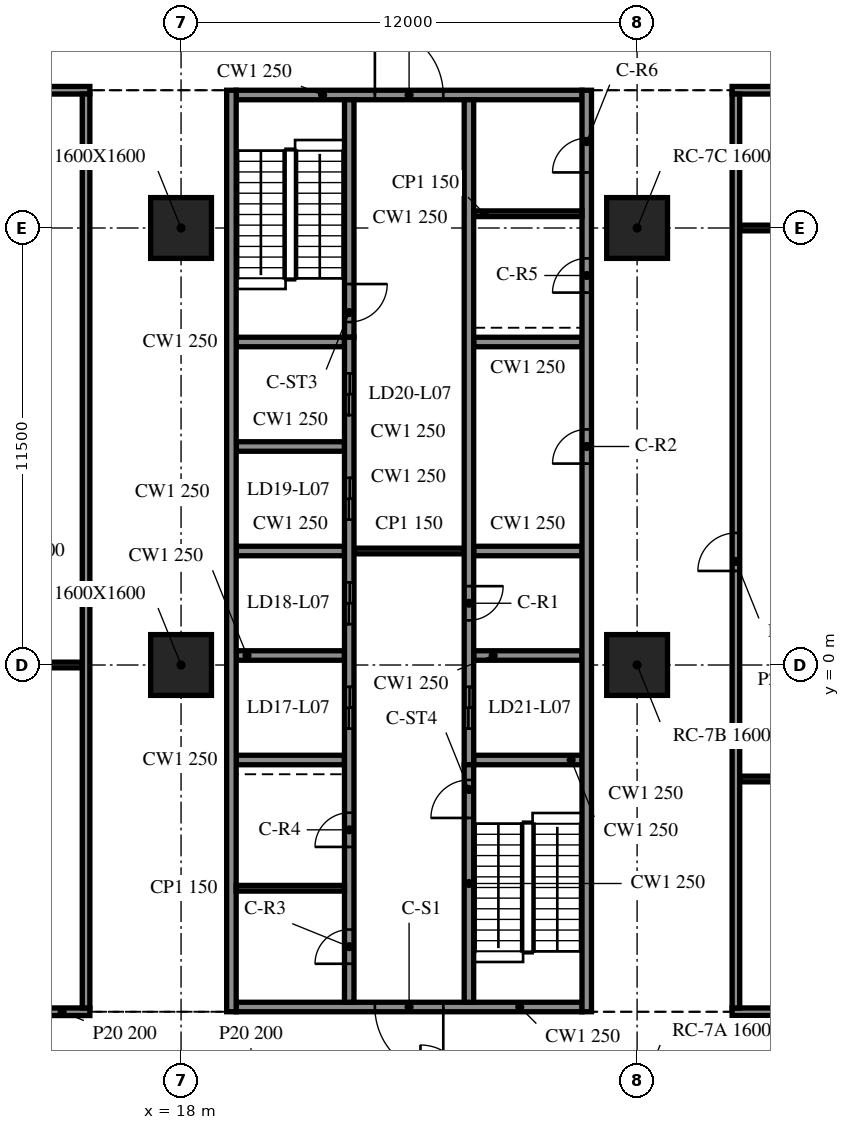
"""IFC4 building model, lengths in metres.
Left out: names, types, materials, properties, quantities, classifications, styles, units other than length and angle.
Written with IfcOpenShell. Run it as: python <this file> out.ifc"""

import sys

from ifc_helpers import new_model, si_unit, direction, frame, frame_2d, origin, origin_2d, place, context, subcontext, project, spatial, rectangle, extrude, element, fill, save


model = new_model("IFC4")
c1 = context("Model", 3, precision=1e-05, world=origin(), true_north=direction((0.0, 1.0)))
c2 = subcontext(c1, "Body", "Model", "MODEL_VIEW")
j1 = project(units=[si_unit("LENGTHUNIT", "METRE"), si_unit("PLANEANGLEUNIT", "RADIAN")], contexts=[c1])
p1 = place(None, origin())
s1 = spatial("IfcSite", under=j1, at=p1, CompositionType="ELEMENT")
p2 = place(p1, origin())
s2 = spatial("IfcBuilding", under=s1, at=p2, CompositionType="ELEMENT")
p3 = place(p2, frame((0.0, 0.0, 33.0)))
s3 = spatial("IfcBuildingStorey", under=s2, at=p3, CompositionType="ELEMENT", Elevation=33.0)
for number, where, z_axis, x_axis in (
    (1, (18.0, 0.0, -0.34), (0.0, 0.0, 1.0), (1.0, 0.0, 0.0)),
    (2, (18.0, 11.5, -0.34), (0.0, 0.0, 1.0), (1.0, 0.0, 0.0)),
    (3, (30.0, 0.0, -0.34), (0.0, 0.0, 1.0), (1.0, 0.0, 0.0)),
    (4, (30.0, 11.5, -0.34), (0.0, 0.0, 1.0), (1.0, 0.0, 0.0)),
):
    element("IfcColumn", number, at=place(p3, frame(where, z_axis=z_axis, x_axis=x_axis)), inside=s3, PredefinedType="COLUMN", context=c2, shape_type="SweptSolid", body=[
        extrude(rectangle(XDim=1.6, YDim=1.6, at=origin_2d()), origin(), (0.0, 0.0, 1.0), 4.3),
    ])
p4 = place(p3, frame((19.325, 15.125, 0.0), z_axis=(0.0, 0.0, 1.0), x_axis=(0.0, -1.0, 0.0)))
e5 = element("IfcWall", 5, at=p4, inside=s3, PredefinedType="SOLIDWALL", context=c2, shape_type="SweptSolid", body=[
    extrude(rectangle(XDim=24.25, YDim=0.25, at=frame_2d((12.125, 0.0))), origin(), (0.0, 0.0, 1.0), 3.96),
])
p5 = place(p3, frame((28.675, -9.125, 0.0), z_axis=(0.0, 0.0, 1.0), x_axis=(0.0, 1.0, 0.0)))
e6 = element("IfcWall", 6, at=p5, inside=s3, PredefinedType="SOLIDWALL", context=c2, shape_type="SweptSolid", body=[
    extrude(rectangle(XDim=24.25, YDim=0.25, at=frame_2d((12.125, 0.0))), origin(), (0.0, 0.0, 1.0), 3.96),
])
p6 = place(p5, frame((14.425, 0.0, 0.0)))
e7 = element("IfcOpeningElement", 7, at=p6, cuts=e6, PredefinedType="OPENING", context=c2, shape_type="SweptSolid", body=[
    extrude(rectangle(XDim=0.9, YDim=2.1, at=frame_2d((0.45, 1.05))), frame((0.0, 0.135, 0.0), z_axis=(0.0, -1.0, 0.0), x_axis=(1.0, 0.0, 0.0)), (0.0, 0.0, 1.0), 0.27),
])
p7 = place(p5, frame((18.925, 0.0, 0.0)))
e8 = element("IfcOpeningElement", 8, at=p7, cuts=e6, PredefinedType="OPENING", context=c2, shape_type="SweptSolid", body=[
    extrude(rectangle(XDim=0.9, YDim=2.1, at=frame_2d((0.45, 1.05))), frame((0.0, 0.135, 0.0), z_axis=(0.0, -1.0, 0.0), x_axis=(1.0, 0.0, 0.0)), (0.0, 0.0, 1.0), 0.27),
])
p8 = place(p5, frame((22.087, 0.0, 0.0)))
e9 = element("IfcOpeningElement", 9, at=p8, cuts=e6, PredefinedType="OPENING", context=c2, shape_type="SweptSolid", body=[
    extrude(rectangle(XDim=0.9, YDim=2.1, at=frame_2d((0.45, 1.05))), frame((0.0, 0.135, 0.0), z_axis=(0.0, -1.0, 0.0), x_axis=(1.0, 0.0, 0.0)), (0.0, 0.0, 1.0), 0.27),
])
p9 = place(p3, frame((28.55, -9.0, 0.0), z_axis=(0.0, 0.0, 1.0), x_axis=(-1.0, 0.0, 0.0)))
e10 = element("IfcWall", 10, at=p9, inside=s3, PredefinedType="SOLIDWALL", context=c2, shape_type="SweptSolid", body=[
    extrude(rectangle(XDim=9.1, YDim=0.25, at=frame_2d((4.55, 0.0))), origin(), (0.0, 0.0, 1.0), 3.96),
])
p10 = place(p9, frame((3.65, 0.0, 0.0)))
e11 = element("IfcOpeningElement", 11, at=p10, cuts=e10, PredefinedType="OPENING", context=c2, shape_type="SweptSolid", body=[
    extrude(rectangle(XDim=1.8, YDim=2.1, at=frame_2d((0.9, 1.05))), frame((0.0, 0.135, 0.0), z_axis=(0.0, -1.0, 0.0), x_axis=(1.0, 0.0, 0.0)), (0.0, 0.0, 1.0), 0.27),
])
p11 = place(p3, frame((19.45, 15.0, 0.0), z_axis=(0.0, 0.0, 1.0), x_axis=(1.0, 0.0, 0.0)))
e12 = element("IfcWall", 12, at=p11, inside=s3, PredefinedType="SOLIDWALL", context=c2, shape_type="SweptSolid", body=[
    extrude(rectangle(XDim=9.1, YDim=0.25, at=frame_2d((4.55, 0.0))), origin(), (0.0, 0.0, 1.0), 3.96),
])
p12 = place(p11, frame((3.65, 0.0, 0.0)))
e13 = element("IfcOpeningElement", 13, at=p12, cuts=e12, PredefinedType="OPENING", context=c2, shape_type="SweptSolid", body=[
    extrude(rectangle(XDim=1.8, YDim=2.1, at=frame_2d((0.9, 1.05))), frame((0.0, 0.135, 0.0), z_axis=(0.0, -1.0, 0.0), x_axis=(1.0, 0.0, 0.0)), (0.0, 0.0, 1.0), 0.27),
])
p13 = place(p3, frame((22.425, -8.875, 0.0), z_axis=(0.0, 0.0, 1.0), x_axis=(0.0, 1.0, 0.0)))
e14 = element("IfcWall", 14, at=p13, inside=s3, PredefinedType="SOLIDWALL", context=c2, shape_type="SweptSolid", body=[
    extrude(rectangle(XDim=17.5, YDim=0.25, at=frame_2d((8.75, 0.0))), origin(), (0.0, 0.0, 1.0), 3.96),
])
p14 = place(p13, frame((7.2, 0.0, 0.0)))
e15 = element("IfcOpeningElement", 15, at=p14, cuts=e14, PredefinedType="OPENING", context=c2, shape_type="SweptSolid", body=[
    extrude(rectangle(XDim=1.1, YDim=2.1, at=frame_2d((0.55, 1.05))), frame((0.0, 0.135, 0.0), z_axis=(0.0, -1.0, 0.0), x_axis=(1.0, 0.0, 0.0)), (0.0, 0.0, 1.0), 0.27),
])
p15 = place(p13, frame((9.95, 0.0, 0.0)))
e16 = element("IfcOpeningElement", 16, at=p15, cuts=e14, PredefinedType="OPENING", context=c2, shape_type="SweptSolid", body=[
    extrude(rectangle(XDim=1.1, YDim=2.1, at=frame_2d((0.55, 1.05))), frame((0.0, 0.135, 0.0), z_axis=(0.0, -1.0, 0.0), x_axis=(1.0, 0.0, 0.0)), (0.0, 0.0, 1.0), 0.27),
])
p16 = place(p13, frame((12.7, 0.0, 0.0)))
e17 = element("IfcOpeningElement", 17, at=p16, cuts=e14, PredefinedType="OPENING", context=c2, shape_type="SweptSolid", body=[
    extrude(rectangle(XDim=1.1, YDim=2.1, at=frame_2d((0.55, 1.05))), frame((0.0, 0.135, 0.0), z_axis=(0.0, -1.0, 0.0), x_axis=(1.0, 0.0, 0.0)), (0.0, 0.0, 1.0), 0.27),
])
p17 = place(p13, frame((15.45, 0.0, 0.0)))
e18 = element("IfcOpeningElement", 18, at=p17, cuts=e14, PredefinedType="OPENING", context=c2, shape_type="SweptSolid", body=[
    extrude(rectangle(XDim=1.1, YDim=2.1, at=frame_2d((0.55, 1.05))), frame((0.0, 0.135, 0.0), z_axis=(0.0, -1.0, 0.0), x_axis=(1.0, 0.0, 0.0)), (0.0, 0.0, 1.0), 0.27),
])
p18 = place(p13, frame((1.012, 0.0, 0.0)))
e19 = element("IfcOpeningElement", 19, at=p18, cuts=e14, PredefinedType="OPENING", context=c2, shape_type="SweptSolid", body=[
    extrude(rectangle(XDim=0.9, YDim=2.1, at=frame_2d((0.45, 1.05))), frame((0.0, 0.135, 0.0), z_axis=(0.0, -1.0, 0.0), x_axis=(1.0, 0.0, 0.0)), (0.0, 0.0, 1.0), 0.27),
])
p19 = place(p13, frame((4.087, 0.0, 0.0)))
e20 = element("IfcOpeningElement", 20, at=p19, cuts=e14, PredefinedType="OPENING", context=c2, shape_type="SweptSolid", body=[
    extrude(rectangle(XDim=0.9, YDim=2.1, at=frame_2d((0.45, 1.05))), frame((0.0, 0.135, 0.0), z_axis=(0.0, -1.0, 0.0), x_axis=(1.0, 0.0, 0.0)), (0.0, 0.0, 1.0), 0.27),
])
p20 = place(p3, frame((22.425, 14.875, 0.0), z_axis=(0.0, 0.0, 1.0), x_axis=(0.0, -1.0, 0.0)))
e21 = element("IfcWall", 21, at=p20, inside=s3, PredefinedType="SOLIDWALL", context=c2, shape_type="SweptSolid", body=[
    extrude(rectangle(XDim=6.25, YDim=0.25, at=frame_2d((3.125, 0.0))), origin(), (0.0, 0.0, 1.0), 3.96),
])
p21 = place(p20, frame((4.85, 0.0, 0.0)))
e22 = element("IfcOpeningElement", 22, at=p21, cuts=e21, PredefinedType="OPENING", context=c2, shape_type="SweptSolid", body=[
    extrude(rectangle(XDim=1.0, YDim=2.1, at=frame_2d((0.5, 1.05))), frame((0.0, 0.135, 0.0), z_axis=(0.0, -1.0, 0.0), x_axis=(1.0, 0.0, 0.0)), (0.0, 0.0, 1.0), 0.27),
])
p22 = place(p3, frame((25.575, -8.875, 0.0), z_axis=(0.0, 0.0, 1.0), x_axis=(0.0, 1.0, 0.0)))
e23 = element("IfcWall", 23, at=p22, inside=s3, PredefinedType="SOLIDWALL", context=c2, shape_type="SweptSolid", body=[
    extrude(rectangle(XDim=6.25, YDim=0.25, at=frame_2d((3.125, 0.0))), origin(), (0.0, 0.0, 1.0), 3.96),
])
p23 = place(p22, frame((4.85, 0.0, 0.0)))
e24 = element("IfcOpeningElement", 24, at=p23, cuts=e23, PredefinedType="OPENING", context=c2, shape_type="SweptSolid", body=[
    extrude(rectangle(XDim=1.0, YDim=2.1, at=frame_2d((0.5, 1.05))), frame((0.0, 0.135, 0.0), z_axis=(0.0, -1.0, 0.0), x_axis=(1.0, 0.0, 0.0)), (0.0, 0.0, 1.0), 0.27),
])
p24 = place(p3, frame((25.575, 14.875, 0.0), z_axis=(0.0, 0.0, 1.0), x_axis=(0.0, -1.0, 0.0)))
e25 = element("IfcWall", 25, at=p24, inside=s3, PredefinedType="SOLIDWALL", context=c2, shape_type="SweptSolid", body=[
    extrude(rectangle(XDim=17.5, YDim=0.25, at=frame_2d((8.75, 0.0))), origin(), (0.0, 0.0, 1.0), 3.96),
])
p25 = place(p24, frame((15.45, 0.0, 0.0)))
e26 = element("IfcOpeningElement", 26, at=p25, cuts=e25, PredefinedType="OPENING", context=c2, shape_type="SweptSolid", body=[
    extrude(rectangle(XDim=1.1, YDim=2.1, at=frame_2d((0.55, 1.05))), frame((0.0, 0.135, 0.0), z_axis=(0.0, -1.0, 0.0), x_axis=(1.0, 0.0, 0.0)), (0.0, 0.0, 1.0), 0.27),
])
p26 = place(p24, frame((12.8, 0.0, 0.0)))
e27 = element("IfcOpeningElement", 27, at=p26, cuts=e25, PredefinedType="OPENING", context=c2, shape_type="SweptSolid", body=[
    extrude(rectangle(XDim=0.9, YDim=2.1, at=frame_2d((0.45, 1.05))), frame((0.0, 0.135, 0.0), z_axis=(0.0, -1.0, 0.0), x_axis=(1.0, 0.0, 0.0)), (0.0, 0.0, 1.0), 0.27),
])
for number, where, z_axis, x_axis in (
    (28, (19.45, -2.5, 0.0), (0.0, 0.0, 1.0), (1.0, 0.0, 0.0)),
    (29, (19.45, 0.25, 0.0), (0.0, 0.0, 1.0), (1.0, 0.0, 0.0)),
    (30, (19.45, 3.0, 0.0), (0.0, 0.0, 1.0), (1.0, 0.0, 0.0)),
    (31, (19.45, 5.75, 0.0), (0.0, 0.0, 1.0), (1.0, 0.0, 0.0)),
    (32, (19.45, 8.5, 0.0), (0.0, 0.0, 1.0), (1.0, 0.0, 0.0)),
    (33, (25.7, -2.5, 0.0), (0.0, 0.0, 1.0), (1.0, 0.0, 0.0)),
    (34, (25.7, 0.25, 0.0), (0.0, 0.0, 1.0), (1.0, 0.0, 0.0)),
    (35, (25.7, 3.0, 0.0), (0.0, 0.0, 1.0), (1.0, 0.0, 0.0)),
    (36, (25.7, 8.5, 0.0), (0.0, 0.0, 1.0), (1.0, 0.0, 0.0)),
):
    element("IfcWall", number, at=place(p3, frame(where, z_axis=z_axis, x_axis=x_axis)), inside=s3, PredefinedType="SOLIDWALL", context=c2, shape_type="SweptSolid", body=[
        extrude(rectangle(XDim=2.85, YDim=0.25, at=frame_2d((1.425, 0.0))), origin(), (0.0, 0.0, 1.0), 3.96),
    ])
p27 = place(p3, frame((22.55, 3.0, 0.0), z_axis=(0.0, 0.0, 1.0), x_axis=(1.0, 0.0, 0.0)))
e37 = element("IfcWall", 37, at=p27, inside=s3, PredefinedType="PARTITIONING", context=c2, shape_type="SweptSolid", body=[
    extrude(rectangle(XDim=2.9, YDim=0.15, at=frame_2d((1.45, 0.0))), origin(), (0.0, 0.0, 1.0), 3.96),
])
for number, where, z_axis, x_axis in (
    (38, (19.45, -5.875, 0.0), (0.0, 0.0, 1.0), (1.0, 0.0, 0.0)),
    (39, (25.7, 11.875, 0.0), (0.0, 0.0, 1.0), (1.0, 0.0, 0.0)),
):
    element("IfcWall", number, at=place(p3, frame(where, z_axis=z_axis, x_axis=x_axis)), inside=s3, PredefinedType="PARTITIONING", context=c2, shape_type="SweptSolid", body=[
        extrude(rectangle(XDim=2.85, YDim=0.15, at=frame_2d((1.425, 0.0))), origin(), (0.0, 0.0, 1.0), 3.96),
    ])
p28 = place(p3, frame((8.3, -9.125, 0.0), z_axis=(0.0, 0.0, 1.0), x_axis=(1.0, 0.0, 0.0)))
e40 = element("IfcWall", 40, at=p28, inside=s3, PredefinedType="PARTITIONING", context=c2, shape_type="SweptSolid", body=[
    extrude(rectangle(XDim=7.3, YDim=0.2, at=frame_2d((3.65, 0.0))), origin(), (0.0, 0.0, 1.0), 3.96),
])
p29 = place(p28, frame((3.1, 0.0, 0.0)))
e41 = element("IfcOpeningElement", 41, at=p29, cuts=e40, PredefinedType="OPENING", context=c2, shape_type="SweptSolid", body=[
    extrude(rectangle(XDim=1.2, YDim=2.1, at=frame_2d((0.6, 1.05))), frame((0.0, 0.11, 0.0), z_axis=(0.0, -1.0, 0.0), x_axis=(1.0, 0.0, 0.0)), (0.0, 0.0, 1.0), 0.22),
])
p30 = place(p3, frame((32.5, -9.125, 0.0), z_axis=(0.0, 0.0, 1.0), x_axis=(1.0, 0.0, 0.0)))
e42 = element("IfcWall", 42, at=p30, inside=s3, PredefinedType="PARTITIONING", context=c2, shape_type="SweptSolid", body=[
    extrude(rectangle(XDim=13.45, YDim=0.2, at=frame_2d((6.725, 0.0))), origin(), (0.0, 0.0, 1.0), 3.96),
])
p31 = place(p30, frame((5.1, 0.0, 0.0)))
e43 = element("IfcOpeningElement", 43, at=p31, cuts=e42, PredefinedType="OPENING", context=c2, shape_type="SweptSolid", body=[
    extrude(rectangle(XDim=1.2, YDim=2.1, at=frame_2d((0.6, 1.05))), frame((0.0, 0.11, 0.0), z_axis=(0.0, -1.0, 0.0), x_axis=(1.0, 0.0, 0.0)), (0.0, 0.0, 1.0), 0.22),
])
p32 = place(p30, frame((6.9, 0.0, 0.0)))
e44 = element("IfcOpeningElement", 44, at=p32, cuts=e42, PredefinedType="OPENING", context=c2, shape_type="SweptSolid", body=[
    extrude(rectangle(XDim=1.2, YDim=2.1, at=frame_2d((0.6, 1.05))), frame((0.0, 0.11, 0.0), z_axis=(0.0, -1.0, 0.0), x_axis=(1.0, 0.0, 0.0)), (0.0, 0.0, 1.0), 0.22),
])
p33 = place(p3, frame((32.7, -3.0, 0.0), z_axis=(0.0, 0.0, 1.0), x_axis=(1.0, 0.0, 0.0)))
e45 = element("IfcWall", 45, at=p33, inside=s3, PredefinedType="PARTITIONING", context=c2, shape_type="SweptSolid", body=[
    extrude(rectangle(XDim=13.05, YDim=0.15, at=frame_2d((6.525, 0.0))), origin(), (0.0, 0.0, 1.0), 3.96),
])
p34 = place(p3, frame((8.5, 0.0, 0.0), z_axis=(0.0, 0.0, 1.0), x_axis=(1.0, 0.0, 0.0)))
e46 = element("IfcWall", 46, at=p34, inside=s3, PredefinedType="PARTITIONING", context=c2, shape_type="SweptSolid", body=[
    extrude(rectangle(XDim=6.9, YDim=0.15, at=frame_2d((3.45, 0.0))), origin(), (0.0, 0.0, 1.0), 3.96),
])
p35 = place(p3, frame((32.7, 11.5, 0.0), z_axis=(0.0, 0.0, 1.0), x_axis=(1.0, 0.0, 0.0)))
e47 = element("IfcWall", 47, at=p35, inside=s3, PredefinedType="PARTITIONING", context=c2, shape_type="SweptSolid", body=[
    extrude(rectangle(XDim=8.5, YDim=0.15, at=frame_2d((4.25, 0.0))), origin(), (0.0, 0.0, 1.0), 3.96),
])
p36 = place(p3, frame((8.3, 15.125, 0.0), z_axis=(0.0, 0.0, 1.0), x_axis=(1.0, 0.0, 0.0)))
e48 = element("IfcWall", 48, at=p36, inside=s3, PredefinedType="PARTITIONING", context=c2, shape_type="SweptSolid", body=[
    extrude(rectangle(XDim=7.3, YDim=0.2, at=frame_2d((3.65, 0.0))), origin(), (0.0, 0.0, 1.0), 3.96),
])
p37 = place(p3, frame((32.5, 15.125, 0.0), z_axis=(0.0, 0.0, 1.0), x_axis=(1.0, 0.0, 0.0)))
e49 = element("IfcWall", 49, at=p37, inside=s3, PredefinedType="PARTITIONING", context=c2, shape_type="SweptSolid", body=[
    extrude(rectangle(XDim=13.45, YDim=0.2, at=frame_2d((6.725, 0.0))), origin(), (0.0, 0.0, 1.0), 3.96),
])
p38 = place(p37, frame((5.3, 0.0, 0.0)))
e50 = element("IfcOpeningElement", 50, at=p38, cuts=e49, PredefinedType="OPENING", context=c2, shape_type="SweptSolid", body=[
    extrude(rectangle(XDim=1.0, YDim=2.1, at=frame_2d((0.5, 1.05))), frame((0.0, 0.11, 0.0), z_axis=(0.0, -1.0, 0.0), x_axis=(1.0, 0.0, 0.0)), (0.0, 0.0, 1.0), 0.22),
])
p39 = place(p37, frame((6.9, 0.0, 0.0)))
e51 = element("IfcOpeningElement", 51, at=p39, cuts=e49, PredefinedType="OPENING", context=c2, shape_type="SweptSolid", body=[
    extrude(rectangle(XDim=1.0, YDim=2.1, at=frame_2d((0.5, 1.05))), frame((0.0, 0.11, 0.0), z_axis=(0.0, -1.0, 0.0), x_axis=(1.0, 0.0, 0.0)), (0.0, 0.0, 1.0), 0.22),
])
p40 = place(p3, frame((15.5, -9.025, 0.0), z_axis=(0.0, 0.0, 1.0), x_axis=(0.0, 1.0, 0.0)))
e52 = element("IfcWall", 52, at=p40, inside=s3, PredefinedType="PARTITIONING", context=c2, shape_type="SweptSolid", body=[
    extrude(rectangle(XDim=24.05, YDim=0.2, at=frame_2d((12.025, 0.0))), origin(), (0.0, 0.0, 1.0), 3.96),
])
p41 = place(p3, frame((32.6, -9.025, 0.0), z_axis=(0.0, 0.0, 1.0), x_axis=(0.0, 1.0, 0.0)))
e53 = element("IfcWall", 53, at=p41, inside=s3, PredefinedType="PARTITIONING", context=c2, shape_type="SweptSolid", body=[
    extrude(rectangle(XDim=24.05, YDim=0.2, at=frame_2d((12.025, 0.0))), origin(), (0.0, 0.0, 1.0), 3.96),
])
p42 = place(p41, frame((11.5, 0.0, 0.0)))
e54 = element("IfcOpeningElement", 54, at=p42, cuts=e53, PredefinedType="OPENING", context=c2, shape_type="SweptSolid", body=[
    extrude(rectangle(XDim=1.0, YDim=2.1, at=frame_2d((0.5, 1.05))), frame((0.0, 0.11, 0.0), z_axis=(0.0, -1.0, 0.0), x_axis=(1.0, 0.0, 0.0)), (0.0, 0.0, 1.0), 0.22),
])
p43 = place(p10, origin())
e55 = element("IfcDoor", 55, at=p43, inside=s3, OperationType="DOUBLE_DOOR_SINGLE_SWING", PredefinedType="DOOR", context=c2, shape_type="SweptSolid", body=[
    extrude(rectangle(XDim=1.8, YDim=2.1, at=frame_2d((0.9, 1.05))), frame((0.0, 0.025, 0.0), z_axis=(0.0, -1.0, 0.0), x_axis=(1.0, 0.0, 0.0)), (0.0, 0.0, 1.0), 0.05),
])
fill(e11, e55)
p44 = place(p12, origin())
e56 = element("IfcDoor", 56, at=p44, inside=s3, OperationType="DOUBLE_DOOR_SINGLE_SWING", PredefinedType="DOOR", context=c2, shape_type="SweptSolid", body=[
    extrude(rectangle(XDim=1.8, YDim=2.1, at=frame_2d((0.9, 1.05))), frame((0.0, 0.025, 0.0), z_axis=(0.0, -1.0, 0.0), x_axis=(1.0, 0.0, 0.0)), (0.0, 0.0, 1.0), 0.05),
])
fill(e13, e56)
p45 = place(p25, origin())
e57 = element("IfcDoor", 57, at=p45, inside=s3, OperationType="DOUBLE_DOOR_SLIDING", PredefinedType="DOOR", context=c2, shape_type="SweptSolid", body=[
    extrude(rectangle(XDim=1.1, YDim=2.1, at=frame_2d((0.55, 1.05))), frame((0.0, 0.025, 0.0), z_axis=(0.0, -1.0, 0.0), x_axis=(1.0, 0.0, 0.0)), (0.0, 0.0, 1.0), 0.05),
])
fill(e26, e57)
p46 = place(p14, origin())
e58 = element("IfcDoor", 58, at=p46, inside=s3, OperationType="DOUBLE_DOOR_SLIDING", PredefinedType="DOOR", context=c2, shape_type="SweptSolid", body=[
    extrude(rectangle(XDim=1.1, YDim=2.1, at=frame_2d((0.55, 1.05))), frame((0.0, 0.025, 0.0), z_axis=(0.0, -1.0, 0.0), x_axis=(1.0, 0.0, 0.0)), (0.0, 0.0, 1.0), 0.05),
])
fill(e15, e58)
p47 = place(p15, origin())
e59 = element("IfcDoor", 59, at=p47, inside=s3, OperationType="DOUBLE_DOOR_SLIDING", PredefinedType="DOOR", context=c2, shape_type="SweptSolid", body=[
    extrude(rectangle(XDim=1.1, YDim=2.1, at=frame_2d((0.55, 1.05))), frame((0.0, 0.025, 0.0), z_axis=(0.0, -1.0, 0.0), x_axis=(1.0, 0.0, 0.0)), (0.0, 0.0, 1.0), 0.05),
])
fill(e16, e59)
p48 = place(p16, origin())
e60 = element("IfcDoor", 60, at=p48, inside=s3, OperationType="DOUBLE_DOOR_SLIDING", PredefinedType="DOOR", context=c2, shape_type="SweptSolid", body=[
    extrude(rectangle(XDim=1.1, YDim=2.1, at=frame_2d((0.55, 1.05))), frame((0.0, 0.025, 0.0), z_axis=(0.0, -1.0, 0.0), x_axis=(1.0, 0.0, 0.0)), (0.0, 0.0, 1.0), 0.05),
])
fill(e17, e60)
p49 = place(p17, origin())
e61 = element("IfcDoor", 61, at=p49, inside=s3, OperationType="DOUBLE_DOOR_SLIDING", PredefinedType="DOOR", context=c2, shape_type="SweptSolid", body=[
    extrude(rectangle(XDim=1.1, YDim=2.1, at=frame_2d((0.55, 1.05))), frame((0.0, 0.025, 0.0), z_axis=(0.0, -1.0, 0.0), x_axis=(1.0, 0.0, 0.0)), (0.0, 0.0, 1.0), 0.05),
])
fill(e18, e61)
p50 = place(p26, origin())
e62 = element("IfcDoor", 62, at=p50, inside=s3, OperationType="SINGLE_SWING_LEFT", PredefinedType="DOOR", context=c2, shape_type="SweptSolid", body=[
    extrude(rectangle(XDim=0.9, YDim=2.1, at=frame_2d((0.45, 1.05))), frame((0.0, 0.025, 0.0), z_axis=(0.0, -1.0, 0.0), x_axis=(1.0, 0.0, 0.0)), (0.0, 0.0, 1.0), 0.05),
])
fill(e27, e62)
p51 = place(p6, origin())
e63 = element("IfcDoor", 63, at=p51, inside=s3, OperationType="SINGLE_SWING_RIGHT", PredefinedType="DOOR", context=c2, shape_type="SweptSolid", body=[
    extrude(rectangle(XDim=0.9, YDim=2.1, at=frame_2d((0.45, 1.05))), frame((0.0, 0.025, 0.0), z_axis=(0.0, -1.0, 0.0), x_axis=(1.0, 0.0, 0.0)), (0.0, 0.0, 1.0), 0.05),
])
fill(e7, e63)
p52 = place(p18, origin())
e64 = element("IfcDoor", 64, at=p52, inside=s3, OperationType="SINGLE_SWING_LEFT", PredefinedType="DOOR", context=c2, shape_type="SweptSolid", body=[
    extrude(rectangle(XDim=0.9, YDim=2.1, at=frame_2d((0.45, 1.05))), frame((0.0, 0.025, 0.0), z_axis=(0.0, -1.0, 0.0), x_axis=(1.0, 0.0, 0.0)), (0.0, 0.0, 1.0), 0.05),
])
fill(e19, e64)
p53 = place(p19, origin())
e65 = element("IfcDoor", 65, at=p53, inside=s3, OperationType="SINGLE_SWING_RIGHT", PredefinedType="DOOR", context=c2, shape_type="SweptSolid", body=[
    extrude(rectangle(XDim=0.9, YDim=2.1, at=frame_2d((0.45, 1.05))), frame((0.0, 0.025, 0.0), z_axis=(0.0, -1.0, 0.0), x_axis=(1.0, 0.0, 0.0)), (0.0, 0.0, 1.0), 0.05),
])
fill(e20, e65)
p54 = place(p7, origin())
e66 = element("IfcDoor", 66, at=p54, inside=s3, OperationType="SINGLE_SWING_LEFT", PredefinedType="DOOR", context=c2, shape_type="SweptSolid", body=[
    extrude(rectangle(XDim=0.9, YDim=2.1, at=frame_2d((0.45, 1.05))), frame((0.0, 0.025, 0.0), z_axis=(0.0, -1.0, 0.0), x_axis=(1.0, 0.0, 0.0)), (0.0, 0.0, 1.0), 0.05),
])
fill(e8, e66)
p55 = place(p8, origin())
e67 = element("IfcDoor", 67, at=p55, inside=s3, OperationType="SINGLE_SWING_RIGHT", PredefinedType="DOOR", context=c2, shape_type="SweptSolid", body=[
    extrude(rectangle(XDim=0.9, YDim=2.1, at=frame_2d((0.45, 1.05))), frame((0.0, 0.025, 0.0), z_axis=(0.0, -1.0, 0.0), x_axis=(1.0, 0.0, 0.0)), (0.0, 0.0, 1.0), 0.05),
])
fill(e9, e67)
p56 = place(p21, origin())
e68 = element("IfcDoor", 68, at=p56, inside=s3, OperationType="SINGLE_SWING_LEFT", PredefinedType="DOOR", context=c2, shape_type="SweptSolid", body=[
    extrude(rectangle(XDim=1.0, YDim=2.1, at=frame_2d((0.5, 1.05))), frame((0.0, 0.025, 0.0), z_axis=(0.0, -1.0, 0.0), x_axis=(1.0, 0.0, 0.0)), (0.0, 0.0, 1.0), 0.05),
])
fill(e22, e68)
p57 = place(p23, origin())
e69 = element("IfcDoor", 69, at=p57, inside=s3, OperationType="SINGLE_SWING_RIGHT", PredefinedType="DOOR", context=c2, shape_type="SweptSolid", body=[
    extrude(rectangle(XDim=1.0, YDim=2.1, at=frame_2d((0.5, 1.05))), frame((0.0, 0.025, 0.0), z_axis=(0.0, -1.0, 0.0), x_axis=(1.0, 0.0, 0.0)), (0.0, 0.0, 1.0), 0.05),
])
fill(e24, e69)
p58 = place(p42, origin())
e70 = element("IfcDoor", 70, at=p58, inside=s3, OperationType="SINGLE_SWING_RIGHT", PredefinedType="DOOR", context=c2, shape_type="SweptSolid", body=[
    extrude(rectangle(XDim=1.0, YDim=2.1, at=frame_2d((0.5, 1.05))), frame((0.0, 0.025, 0.0), z_axis=(0.0, -1.0, 0.0), x_axis=(1.0, 0.0, 0.0)), (0.0, 0.0, 1.0), 0.05),
])
fill(e54, e70)
save(model, sys.argv[1])
